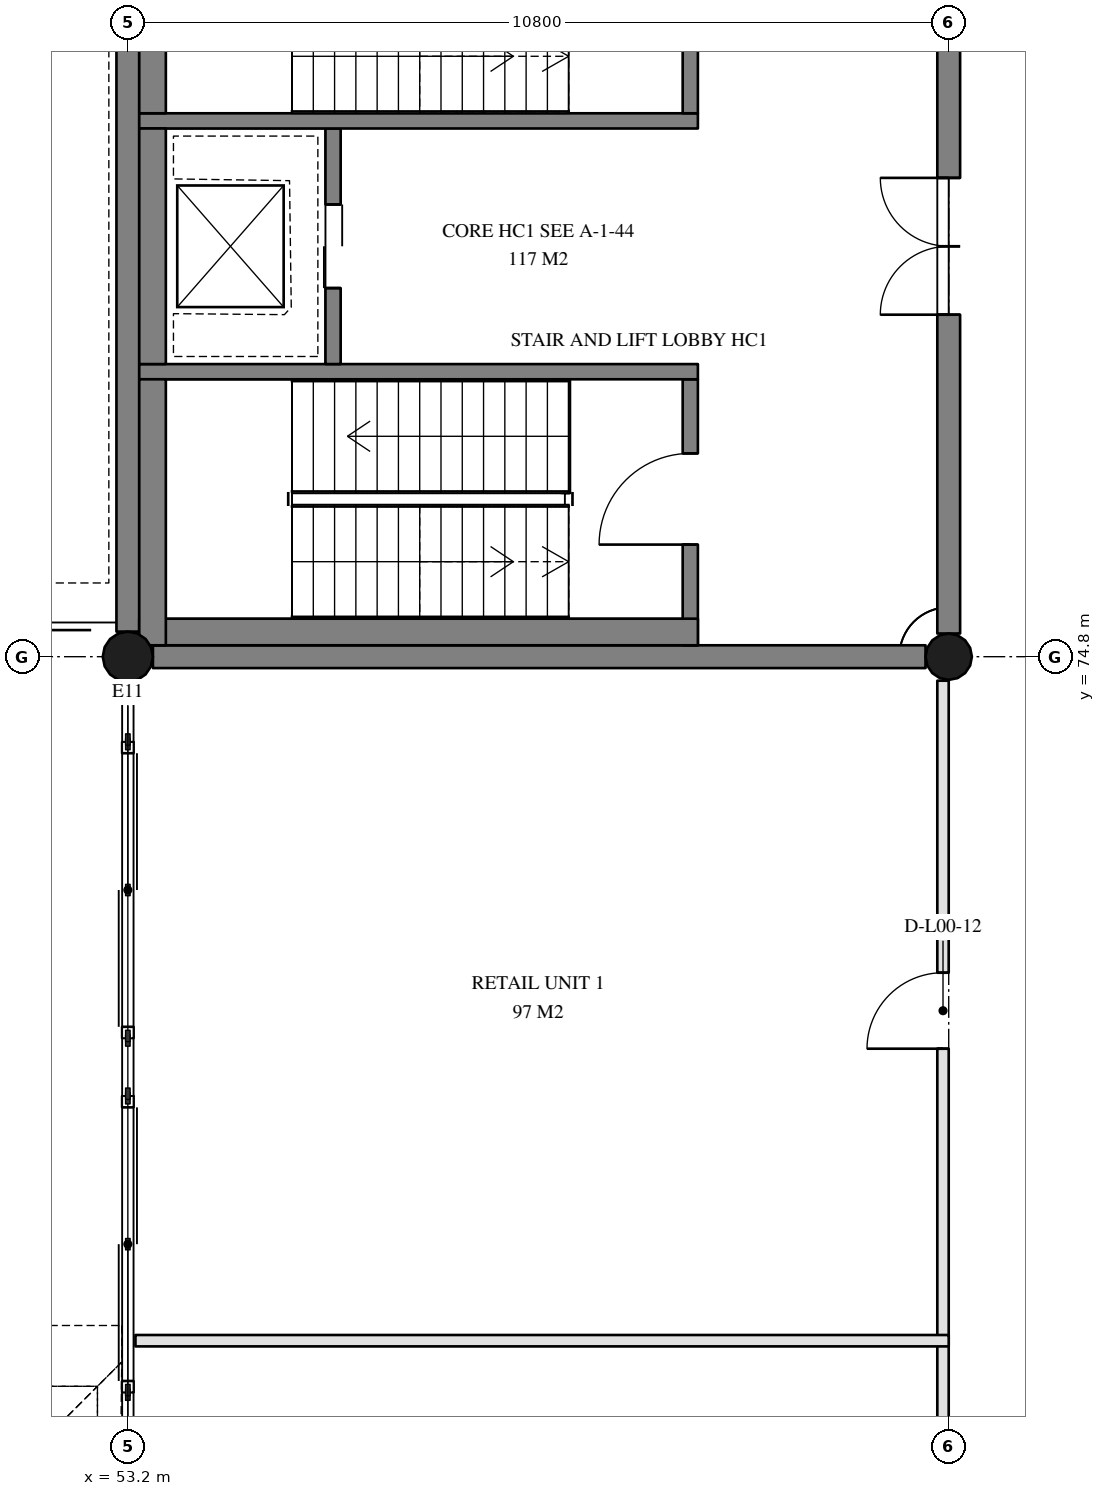
"""IFC4 building model, lengths in metres.
Left out: names, types, materials, properties, quantities, classifications, styles, units other than length and angle.
Written with IfcOpenShell. Run it as: python <this file> out.ifc"""

import sys

from ifc_helpers import new_model, si_unit, direction, frame, frame_2d, origin, origin_2d, place, context, subcontext, project, spatial, rectangle, hollow_circle, extrude, element, fill, save


model = new_model("IFC4")
c1 = context("Model", 3, precision=1e-05, world=origin(), true_north=direction((0.0, 1.0)))
c2 = subcontext(c1, "Body", "Model", "MODEL_VIEW")
j1 = project(units=[si_unit("LENGTHUNIT", "METRE"), si_unit("PLANEANGLEUNIT", "RADIAN")], contexts=[c1])
p1 = place(None, origin())
s1 = spatial("IfcSite", under=j1, at=p1, CompositionType="ELEMENT")
p2 = place(p1, origin())
s2 = spatial("IfcBuilding", under=s1, at=p2, CompositionType="ELEMENT")
p3 = place(p2, origin())
s3 = spatial("IfcBuildingStorey", under=s2, at=p3, CompositionType="ELEMENT", Elevation=0.0)
p4 = place(p3, frame((53.2, 74.8, 0.0), z_axis=(0.0, 0.0, 1.0), x_axis=(1.0, 0.0, 0.0)))
e1 = element("IfcColumn", 1, at=p4, inside=s3, PredefinedType="COLUMN", context=c2, shape_type="SweptSolid", body=[
    extrude(hollow_circle(Radius=0.33, WallThickness=0.025, at=origin_2d()), origin(), (0.0, 0.0, 1.0), 4.8),
])
p5 = place(p3, frame((64.0, 74.8, 0.0), z_axis=(0.0, 0.0, 1.0), x_axis=(1.0, 0.0, 0.0)))
e2 = element("IfcColumn", 2, at=p5, inside=s3, PredefinedType="COLUMN", context=c2, shape_type="SweptSolid", body=[
    extrude(hollow_circle(Radius=0.305, WallThickness=0.025, at=origin_2d()), origin(), (0.0, 0.0, 1.0), 4.8),
])
p6 = place(p3, frame((53.53, 74.8, 0.0), z_axis=(0.0, 0.0, 1.0), x_axis=(1.0, 0.0, 0.0)))
e3 = element("IfcWall", 3, at=p6, inside=s3, PredefinedType="SOLIDWALL", context=c2, shape_type="SweptSolid", body=[
    extrude(rectangle(XDim=10.165, YDim=0.3, at=frame_2d((5.083, 0.0))), origin(), (0.0, 0.0, 1.0), 4.8),
])
p7 = place(p3, frame((64.0, 75.105, 0.0), z_axis=(0.0, 0.0, 1.0), x_axis=(0.0, 1.0, 0.0)))
e4 = element("IfcWall", 4, at=p7, inside=s3, PredefinedType="SOLIDWALL", context=c2, shape_type="SweptSolid", body=[
    extrude(rectangle(XDim=10.165, YDim=0.3, at=frame_2d((5.083, 0.0))), origin(), (0.0, 0.0, 1.0), 4.8),
])
p8 = place(p7, frame((4.195, 0.0, 0.0)))
e5 = element("IfcOpeningElement", 5, at=p8, cuts=e4, PredefinedType="OPENING", context=c2, shape_type="SweptSolid", body=[
    extrude(rectangle(XDim=1.8, YDim=2.1, at=frame_2d((0.9, 1.05))), frame((0.0, 0.16, 0.0), z_axis=(0.0, -1.0, 0.0), x_axis=(1.0, 0.0, 0.0)), (0.0, 0.0, 1.0), 0.32),
])
p9 = place(p3, frame((53.2, 85.27, 0.0), z_axis=(0.0, 0.0, 1.0), x_axis=(0.0, -1.0, 0.0)))
e6 = element("IfcWall", 6, at=p9, inside=s3, PredefinedType="SOLIDWALL", context=c2, shape_type="SweptSolid", body=[
    extrude(rectangle(XDim=10.14, YDim=0.3, at=frame_2d((5.07, 0.0))), origin(), (0.0, 0.0, 1.0), 4.8),
])
p10 = place(p3, frame((53.2, 65.12, 0.0), z_axis=(0.0, 0.0, 1.0), x_axis=(0.0, 1.0, 0.0)))
e7 = element("IfcWall", 7, at=p10, inside=s3, PredefinedType="SOLIDWALL", context=c2, shape_type="SweptSolid", body=[
    extrude(rectangle(XDim=3.9, YDim=0.15, at=frame_2d((1.95, 0.0))), origin(), (0.0, 0.0, 1.0), 2.6),
])
p11 = place(p10, frame((0.15, 0.0, 0.0)))
e8 = element("IfcOpeningElement", 8, at=p11, cuts=e7, PredefinedType="OPENING", context=c2, shape_type="SweptSolid", body=[
    extrude(rectangle(XDim=3.6, YDim=2.4, at=frame_2d((1.8, 1.2))), frame((0.0, 0.085, 0.0), z_axis=(0.0, -1.0, 0.0), x_axis=(1.0, 0.0, 0.0)), (0.0, 0.0, 1.0), 0.17),
])
p12 = place(p3, frame((53.2, 69.78, 0.0), z_axis=(0.0, 0.0, 1.0), x_axis=(0.0, 1.0, 0.0)))
e9 = element("IfcWall", 9, at=p12, inside=s3, PredefinedType="SOLIDWALL", context=c2, shape_type="SweptSolid", body=[
    extrude(rectangle(XDim=3.9, YDim=0.15, at=frame_2d((1.95, 0.0))), origin(), (0.0, 0.0, 1.0), 2.6),
])
p13 = place(p12, frame((0.15, 0.0, 0.0)))
e10 = element("IfcOpeningElement", 10, at=p13, cuts=e9, PredefinedType="OPENING", context=c2, shape_type="SweptSolid", body=[
    extrude(rectangle(XDim=3.6, YDim=2.4, at=frame_2d((1.8, 1.2))), frame((0.0, 0.085, 0.0), z_axis=(0.0, -1.0, 0.0), x_axis=(1.0, 0.0, 0.0)), (0.0, 0.0, 1.0), 0.17),
])
p14 = place(p3, frame((60.6, 74.95, 0.0), z_axis=(0.0, 0.0, 1.0), x_axis=(0.0, 1.0, 0.0)))
e11 = element("IfcWall", 11, at=p14, inside=s3, PredefinedType="SOLIDWALL", context=c2, shape_type="SweptSolid", body=[
    extrude(rectangle(XDim=3.5, YDim=0.2, at=frame_2d((1.75, 0.0))), origin(), (0.0, 0.0, 1.0), 4.4),
])
p15 = place(p14, frame((1.325, 0.0, 0.0)))
e12 = element("IfcOpeningElement", 12, at=p15, cuts=e11, PredefinedType="OPENING", context=c2, shape_type="SweptSolid", body=[
    extrude(rectangle(XDim=1.2, YDim=2.1, at=frame_2d((0.6, 1.05))), frame((0.0, 0.11, 0.0), z_axis=(0.0, -1.0, 0.0), x_axis=(1.0, 0.0, 0.0)), (0.0, 0.0, 1.0), 0.22),
])
p16 = place(p3, frame((60.7, 78.55, 0.0), z_axis=(0.0, 0.0, 1.0), x_axis=(-1.0, 0.0, 0.0)))
e13 = element("IfcWall", 13, at=p16, inside=s3, PredefinedType="SOLIDWALL", context=c2, shape_type="SweptSolid", body=[
    extrude(rectangle(XDim=7.35, YDim=0.2, at=frame_2d((3.675, 0.0))), origin(), (0.0, 0.0, 1.0), 4.4),
])
p17 = place(p3, frame((55.9, 78.65, 0.0), z_axis=(0.0, 0.0, 1.0), x_axis=(0.0, 1.0, 0.0)))
e14 = element("IfcWall", 14, at=p17, inside=s3, PredefinedType="SOLIDWALL", context=c2, shape_type="SweptSolid", body=[
    extrude(rectangle(XDim=3.1, YDim=0.2, at=frame_2d((1.55, 0.0))), origin(), (0.0, 0.0, 1.0), 4.4),
])
p18 = place(p17, frame((1.0, 0.0, 0.0)))
e15 = element("IfcOpeningElement", 15, at=p18, cuts=e14, PredefinedType="OPENING", context=c2, shape_type="SweptSolid", body=[
    extrude(rectangle(XDim=1.1, YDim=2.1, at=frame_2d((0.55, 1.05))), frame((0.0, 0.11, 0.0), z_axis=(0.0, -1.0, 0.0), x_axis=(1.0, 0.0, 0.0)), (0.0, 0.0, 1.0), 0.22),
])
p19 = place(p3, frame((60.7, 81.85, 0.0), z_axis=(0.0, 0.0, 1.0), x_axis=(-1.0, 0.0, 0.0)))
e16 = element("IfcWall", 16, at=p19, inside=s3, PredefinedType="SOLIDWALL", context=c2, shape_type="SweptSolid", body=[
    extrude(rectangle(XDim=7.35, YDim=0.2, at=frame_2d((3.675, 0.0))), origin(), (0.0, 0.0, 1.0), 4.4),
])
p20 = place(p3, frame((60.6, 81.95, 0.0), z_axis=(0.0, 0.0, 1.0), x_axis=(0.0, 1.0, 0.0)))
e17 = element("IfcWall", 17, at=p20, inside=s3, PredefinedType="SOLIDWALL", context=c2, shape_type="SweptSolid", body=[
    extrude(rectangle(XDim=3.5, YDim=0.2, at=frame_2d((1.75, 0.0))), origin(), (0.0, 0.0, 1.0), 4.4),
])
p21 = place(p20, frame((0.975, 0.0, 0.0)))
e18 = element("IfcOpeningElement", 18, at=p21, cuts=e17, PredefinedType="OPENING", context=c2, shape_type="SweptSolid", body=[
    extrude(rectangle(XDim=1.2, YDim=2.1, at=frame_2d((0.6, 1.05))), frame((0.0, 0.11, 0.0), z_axis=(0.0, -1.0, 0.0), x_axis=(1.0, 0.0, 0.0)), (0.0, 0.0, 1.0), 0.22),
])
p22 = place(p3, frame((60.7, 75.125, -0.6), z_axis=(0.0, 0.0, 1.0), x_axis=(-1.0, 0.0, 0.0)))
e19 = element("IfcWall", 19, at=p22, inside=s3, PredefinedType="SOLIDWALL", context=c2, shape_type="SweptSolid", body=[
    extrude(rectangle(XDim=7.35, YDim=0.35, at=frame_2d((3.675, 0.0))), origin(), (0.0, 0.0, 1.0), 5.0),
])
for number, where, z_axis, x_axis in (
    (20, (53.525, 74.95, -0.6), (0.0, 0.0, 1.0), (0.0, 1.0, 0.0)),
    (21, (53.525, 81.95, -0.6), (0.0, 0.0, 1.0), (0.0, 1.0, 0.0)),
):
    element("IfcWall", number, at=place(p3, frame(where, z_axis=z_axis, x_axis=x_axis)), inside=s3, PredefinedType="SOLIDWALL", context=c2, shape_type="SweptSolid", body=[
        extrude(rectangle(XDim=3.5, YDim=0.35, at=frame_2d((1.75, 0.0))), origin(), (0.0, 0.0, 1.0), 5.0),
    ])
p23 = place(p3, frame((53.525, 78.65, -0.6), z_axis=(0.0, 0.0, 1.0), x_axis=(0.0, 1.0, 0.0)))
e22 = element("IfcWall", 22, at=p23, inside=s3, PredefinedType="SOLIDWALL", context=c2, shape_type="SweptSolid", body=[
    extrude(rectangle(XDim=3.1, YDim=0.35, at=frame_2d((1.55, 0.0))), origin(), (0.0, 0.0, 1.0), 5.0),
])
p24 = place(p3, frame((63.925, 64.29, 0.0), z_axis=(0.0, 0.0, 1.0), x_axis=(0.0, 1.0, 0.0)))
e23 = element("IfcWall", 23, at=p24, inside=s3, PredefinedType="PARTITIONING", context=c2, shape_type="SweptSolid", body=[
    extrude(rectangle(XDim=1.51, YDim=0.15, at=frame_2d((0.755, 0.0))), origin(), (0.0, 0.0, 1.0), 3.9),
])
p25 = place(p3, frame((63.925, 65.8, 0.0), z_axis=(0.0, 0.0, 1.0), x_axis=(0.0, 1.0, 0.0)))
e24 = element("IfcWall", 24, at=p25, inside=s3, PredefinedType="PARTITIONING", context=c2, shape_type="SweptSolid", body=[
    extrude(rectangle(XDim=8.684, YDim=0.15, at=frame_2d((4.342, 0.0))), origin(), (0.0, 0.0, 1.0), 3.9),
])
p26 = place(p25, frame((3.842, 0.0, 0.0)))
e25 = element("IfcOpeningElement", 25, at=p26, cuts=e24, PredefinedType="OPENING", context=c2, shape_type="SweptSolid", body=[
    extrude(rectangle(XDim=1.0, YDim=2.1, at=frame_2d((0.5, 1.05))), frame((0.0, 0.085, 0.0), z_axis=(0.0, -1.0, 0.0), x_axis=(1.0, 0.0, 0.0)), (0.0, 0.0, 1.0), 0.17),
])
p27 = place(p3, frame((53.3, 65.8, 0.0), z_axis=(0.0, 0.0, 1.0), x_axis=(1.0, 0.0, 0.0)))
e26 = element("IfcWall", 26, at=p27, inside=s3, PredefinedType="PARTITIONING", context=c2, shape_type="SweptSolid", body=[
    extrude(rectangle(XDim=10.7, YDim=0.15, at=frame_2d((5.35, 0.0))), origin(), (0.0, 0.0, 1.0), 3.9),
])
p28 = place(p11, origin())
e27 = element("IfcDoor", 27, at=p28, inside=s3, OperationType="DOUBLE_DOOR_SLIDING", PredefinedType="DOOR", context=c2, shape_type="SweptSolid", body=[
    extrude(rectangle(XDim=3.6, YDim=2.4, at=frame_2d((1.8, 1.2))), frame((0.0, 0.025, 0.0), z_axis=(0.0, -1.0, 0.0), x_axis=(1.0, 0.0, 0.0)), (0.0, 0.0, 1.0), 0.05),
])
fill(e8, e27)
p29 = place(p13, origin())
e28 = element("IfcDoor", 28, at=p29, inside=s3, OperationType="DOUBLE_DOOR_SLIDING", PredefinedType="DOOR", context=c2, shape_type="SweptSolid", body=[
    extrude(rectangle(XDim=3.6, YDim=2.4, at=frame_2d((1.8, 1.2))), frame((0.0, 0.025, 0.0), z_axis=(0.0, -1.0, 0.0), x_axis=(1.0, 0.0, 0.0)), (0.0, 0.0, 1.0), 0.05),
])
fill(e10, e28)
p30 = place(p18, frame((1.1, 0.0, 0.0), z_axis=(0.0, 0.0, 1.0), x_axis=(-1.0, 0.0, 0.0)))
e29 = element("IfcDoor", 29, at=p30, inside=s3, OperationType="DOUBLE_DOOR_SLIDING", PredefinedType="DOOR", context=c2, shape_type="SweptSolid", body=[
    extrude(rectangle(XDim=1.1, YDim=2.1, at=frame_2d((0.55, 1.05))), frame((0.0, 0.025, 0.0), z_axis=(0.0, -1.0, 0.0), x_axis=(1.0, 0.0, 0.0)), (0.0, 0.0, 1.0), 0.05),
])
fill(e15, e29)
p31 = place(p15, frame((1.2, 0.0, 0.0), z_axis=(0.0, 0.0, 1.0), x_axis=(-1.0, 0.0, 0.0)))
e30 = element("IfcDoor", 30, at=p31, inside=s3, OperationType="SINGLE_SWING_LEFT", PredefinedType="DOOR", context=c2, shape_type="SweptSolid", body=[
    extrude(rectangle(XDim=1.2, YDim=2.1, at=frame_2d((0.6, 1.05))), frame((0.0, 0.025, 0.0), z_axis=(0.0, -1.0, 0.0), x_axis=(1.0, 0.0, 0.0)), (0.0, 0.0, 1.0), 0.05),
])
fill(e12, e30)
p32 = place(p8, frame((1.8, 0.0, 0.0), z_axis=(0.0, 0.0, 1.0), x_axis=(-1.0, 0.0, 0.0)))
e31 = element("IfcDoor", 31, at=p32, inside=s3, OperationType="DOUBLE_DOOR_DOUBLE_SWING", PredefinedType="DOOR", context=c2, shape_type="SweptSolid", body=[
    extrude(rectangle(XDim=1.8, YDim=2.1, at=frame_2d((0.9, 1.05))), frame((0.0, 0.025, 0.0), z_axis=(0.0, -1.0, 0.0), x_axis=(1.0, 0.0, 0.0)), (0.0, 0.0, 1.0), 0.05),
])
fill(e5, e31)
p33 = place(p26, origin())
e32 = element("IfcDoor", 32, at=p33, inside=s3, OperationType="SINGLE_SWING_LEFT", PredefinedType="DOOR", context=c2, shape_type="SweptSolid", body=[
    extrude(rectangle(XDim=1.0, YDim=2.1, at=frame_2d((0.5, 1.05))), frame((0.0, 0.025, 0.0), z_axis=(0.0, -1.0, 0.0), x_axis=(1.0, 0.0, 0.0)), (0.0, 0.0, 1.0), 0.05),
])
fill(e25, e32)
save(model, sys.argv[1])
